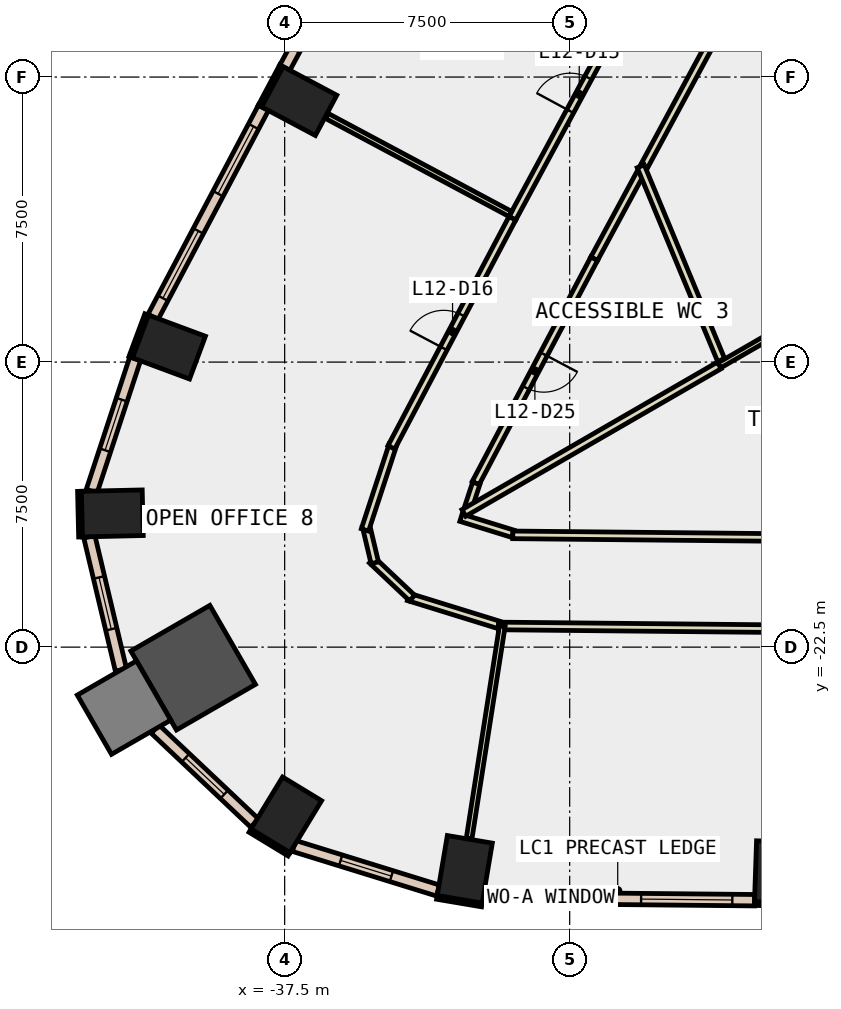
"""IFC4 building model, lengths in metres.
Left out: names, types, materials, properties, quantities, classifications, styles, units other than length and angle.
Written with IfcOpenShell. Run it as: python <this file> out.ifc"""

import sys

from ifc_helpers import new_model, si_unit, direction, frame, frame_2d, origin, origin_2d, place, context, subcontext, project, spatial, rectangle, extrude, element, fill, save


model = new_model("IFC4")
c1 = context("Model", 3, precision=1e-05, world=origin(), true_north=direction((0.0, 1.0)))
c2 = subcontext(c1, "Body", "Model", "MODEL_VIEW")
j1 = project(units=[si_unit("LENGTHUNIT", "METRE"), si_unit("PLANEANGLEUNIT", "RADIAN")], contexts=[c1])
p1 = place(None, origin())
s1 = spatial("IfcSite", under=j1, at=p1, CompositionType="ELEMENT")
p2 = place(p1, origin())
s2 = spatial("IfcBuilding", under=s1, at=p2, CompositionType="ELEMENT")
p3 = place(p2, frame((0.0, 0.0, 60.2)))
s3 = spatial("IfcBuildingStorey", under=s2, at=p3, CompositionType="ELEMENT", Elevation=60.2)
for number, where, z_axis, x_axis in (
    (1, (-32.761, -28.346, -0.4), (0.0, 0.0, 1.0), (-0.986, 0.167, 0.0)),
    (2, (-24.51, -28.416, -0.4), (0.0, 0.0, 1.0), (-0.999, 0.034, 0.0)),
    (3, (-37.117, -8.132, -0.4), (0.0, 0.0, 1.0), (0.469, 0.883, 0.0)),
    (4, (-40.544, -14.604, -0.4), (0.0, 0.0, 1.0), (0.348, 0.937, 0.0)),
    (5, (-42.035, -18.982, -0.4), (0.0, 0.0, 1.0), (-0.023, 1.0, 0.0)),
):
    element("IfcColumn", number, at=place(p3, frame(where, z_axis=z_axis, x_axis=x_axis)), inside=s3, PredefinedType="COLUMN", context=c2, shape_type="SweptSolid", body=[
        extrude(rectangle(XDim=1.2, YDim=1.6, at=origin_2d()), origin(), (0.0, 0.0, 1.0), 4.2),
    ])
p4 = place(p3, frame((-39.908, -23.041, -0.4), z_axis=(0.0, 0.0, 1.0), x_axis=(0.866025403784, 0.5, 0.0)))
e6 = element("IfcColumn", 6, at=p4, inside=s3, PredefinedType="COLUMN", context=c2, shape_type="SweptSolid", body=[
    extrude(rectangle(XDim=2.4, YDim=2.4, at=origin_2d()), origin(), (0.0, 0.0, 1.0), 4.2),
])
p5 = place(p3, frame((-37.457, -26.913, -0.4), z_axis=(0.0, 0.0, 1.0), x_axis=(-0.854522294989, 0.519414716163, 0.0)))
e7 = element("IfcColumn", 7, at=p5, inside=s3, PredefinedType="COLUMN", context=c2, shape_type="SweptSolid", body=[
    extrude(rectangle(XDim=1.2, YDim=1.6, at=origin_2d()), origin(), (0.0, 0.0, 1.0), 4.2),
])
p6 = place(p3, frame((-41.727, -24.091, -0.4), z_axis=(0.0, 0.0, 1.0), x_axis=(0.866025403784, 0.5, 0.0)))
e8 = element("IfcColumn", 8, at=p6, inside=s3, PredefinedType="COLUMN", context=c2, shape_type="SweptSolid", body=[
    extrude(rectangle(XDim=1.8, YDim=1.8, at=origin_2d()), origin(), (0.0, 0.0, 1.0), 4.2),
])
p7 = place(p3, frame((-37.586, -7.204, 0.0), z_axis=(0.0, 0.0, 1.0), x_axis=(-0.469467784567, -0.882949601763, 0.0)))
e9 = element("IfcWall", 9, at=p7, inside=s3, PredefinedType="STANDARD", context=c2, shape_type="SweptSolid", body=[
    extrude(rectangle(XDim=1.199, YDim=0.1, at=frame_2d((0.6, 0.0))), origin(), (0.0, 0.0, 1.0), 3.8),
])
p8 = place(p3, frame((-41.132, -13.746, 0.0), z_axis=(0.0, 0.0, 1.0), x_axis=(-0.348268249601, -0.937394914814, 0.0)))
e10 = element("IfcWall", 10, at=p8, inside=s3, PredefinedType="STANDARD", context=c2, shape_type="SweptSolid", body=[
    extrude(rectangle(XDim=1.2, YDim=0.1, at=frame_2d((0.6, 0.0))), origin(), (0.0, 0.0, 1.0), 3.8),
])
for number, where, z_axis, x_axis in (
    (11, (-33.494, -29.084, 0.0), (0.0, 0.0, 1.0), (0.986, -0.167, 0.0)),
    (12, (-25.138, -29.245, 0.0), (0.0, 0.0, 1.0), (0.999, -0.033, 0.0)),
):
    element("IfcWall", number, at=place(p3, frame(where, z_axis=z_axis, x_axis=x_axis)), inside=s3, PredefinedType="STANDARD", context=c2, shape_type="SweptSolid", body=[
        extrude(rectangle(XDim=1.2, YDim=0.1, at=frame_2d((0.6, 0.0))), origin(), (0.0, 0.0, 1.0), 3.8),
    ])
p9 = place(p3, frame((-42.899, -18.401, 0.0), z_axis=(0.0, 0.0, 1.0), x_axis=(0.023183352363, -0.999731229968, 0.0)))
e13 = element("IfcWall", 13, at=p9, inside=s3, PredefinedType="STANDARD", context=c2, shape_type="SweptSolid", body=[
    extrude(rectangle(XDim=1.2, YDim=0.1, at=frame_2d((0.6, 0.0))), origin(), (0.0, 0.0, 1.0), 3.8),
])
p10 = place(p3, frame((-38.411, -27.328, 0.0), z_axis=(0.0, 0.0, 1.0), x_axis=(0.854716608594, -0.519094903649, 0.0)))
e14 = element("IfcWall", 14, at=p10, inside=s3, PredefinedType="STANDARD", context=c2, shape_type="SweptSolid", body=[
    extrude(rectangle(XDim=1.2, YDim=0.1, at=frame_2d((0.6, 0.0))), origin(), (0.0, 0.0, 1.0), 3.8),
])
p11 = place(p3, frame((-32.279, -29.089, 0.0), z_axis=(0.0, 0.0, 1.0), x_axis=(0.999952253205, -0.009771965572, 0.0)))
e15 = element("IfcWall", 15, at=p11, inside=s3, PredefinedType="STANDARD", context=c2, shape_type="SweptSolid", body=[
    extrude(rectangle(XDim=7.145, YDim=0.3, at=frame_2d((3.573, 0.0))), origin(), (0.0, 0.0, 1.0), 3.8),
])
p12 = place(p11, frame((0.586, 0.0, 0.9)))
e16 = element("IfcOpeningElement", 16, at=p12, cuts=e15, PredefinedType="OPENING", context=c2, shape_type="SweptSolid", body=[
    extrude(rectangle(XDim=2.4, YDim=2.6, at=frame_2d((1.2, 1.3))), frame((0.0, 0.16, 0.0), z_axis=(0.0, -1.0, 0.0), x_axis=(1.0, 0.0, 0.0)), (0.0, 0.0, 1.0), 0.32),
])
p13 = place(p11, frame((4.159, 0.0, 0.9)))
e17 = element("IfcOpeningElement", 17, at=p13, cuts=e15, PredefinedType="OPENING", context=c2, shape_type="SweptSolid", body=[
    extrude(rectangle(XDim=2.4, YDim=2.6, at=frame_2d((1.2, 1.3))), frame((0.0, 0.16, 0.0), z_axis=(0.0, -1.0, 0.0), x_axis=(1.0, 0.0, 0.0)), (0.0, 0.0, 1.0), 0.32),
])
p14 = place(p3, frame((-34.583, -1.864, 0.0), z_axis=(0.0, 0.0, 1.0), x_axis=(-0.475413659872, -0.879762383833, 0.0)))
e18 = element("IfcWall", 18, at=p14, inside=s3, PredefinedType="STANDARD", context=c2, shape_type="SweptSolid", body=[
    extrude(rectangle(XDim=6.125, YDim=0.3, at=frame_2d((3.063, 0.0))), origin(), (0.0, 0.0, 1.0), 3.8),
])
p15 = place(p14, frame((0.531, 0.0, 0.9)))
e19 = element("IfcOpeningElement", 19, at=p15, cuts=e18, PredefinedType="OPENING", context=c2, shape_type="SweptSolid", body=[
    extrude(rectangle(XDim=2.0, YDim=2.6, at=frame_2d((1.0, 1.3))), frame((0.0, 0.16, 0.0), z_axis=(0.0, -1.0, 0.0), x_axis=(1.0, 0.0, 0.0)), (0.0, 0.0, 1.0), 0.32),
])
p16 = place(p14, frame((3.594, 0.0, 0.9)))
e20 = element("IfcOpeningElement", 20, at=p16, cuts=e18, PredefinedType="OPENING", context=c2, shape_type="SweptSolid", body=[
    extrude(rectangle(XDim=2.0, YDim=2.6, at=frame_2d((1.0, 1.3))), frame((0.0, 0.16, 0.0), z_axis=(0.0, -1.0, 0.0), x_axis=(1.0, 0.0, 0.0)), (0.0, 0.0, 1.0), 0.32),
])
p17 = place(p3, frame((-38.059, -8.31, 0.0), z_axis=(0.0, 0.0, 1.0), x_axis=(-0.467041710902, -0.884235285587, 0.0)))
e21 = element("IfcWall", 21, at=p17, inside=s3, PredefinedType="STANDARD", context=c2, shape_type="SweptSolid", body=[
    extrude(rectangle(XDim=6.22, YDim=0.3, at=frame_2d((3.11, 0.0))), origin(), (0.0, 0.0, 1.0), 3.8),
])
p18 = place(p17, frame((0.555, 0.0, 0.9)))
e22 = element("IfcOpeningElement", 22, at=p18, cuts=e21, PredefinedType="OPENING", context=c2, shape_type="SweptSolid", body=[
    extrude(rectangle(XDim=2.0, YDim=2.6, at=frame_2d((1.0, 1.3))), frame((0.0, 0.16, 0.0), z_axis=(0.0, -1.0, 0.0), x_axis=(1.0, 0.0, 0.0)), (0.0, 0.0, 1.0), 0.32),
])
p19 = place(p17, frame((3.665, 0.0, 0.9)))
e23 = element("IfcOpeningElement", 23, at=p19, cuts=e21, PredefinedType="OPENING", context=c2, shape_type="SweptSolid", body=[
    extrude(rectangle(XDim=2.0, YDim=2.6, at=frame_2d((1.0, 1.3))), frame((0.0, 0.16, 0.0), z_axis=(0.0, -1.0, 0.0), x_axis=(1.0, 0.0, 0.0)), (0.0, 0.0, 1.0), 0.32),
])
p20 = place(p3, frame((-41.434, -14.913, 0.0), z_axis=(0.0, 0.0, 1.0), x_axis=(-0.31208801137, -0.95005319491, 0.0)))
e24 = element("IfcWall", 24, at=p20, inside=s3, PredefinedType="STANDARD", context=c2, shape_type="SweptSolid", body=[
    extrude(rectangle(XDim=3.665, YDim=0.3, at=frame_2d((1.833, 0.0))), origin(), (0.0, 0.0, 1.0), 3.8),
])
p21 = place(p20, frame((1.133, 0.0, 0.9)))
e25 = element("IfcOpeningElement", 25, at=p21, cuts=e24, PredefinedType="OPENING", context=c2, shape_type="SweptSolid", body=[
    extrude(rectangle(XDim=1.4, YDim=2.6, at=frame_2d((0.7, 1.3))), frame((0.0, 0.16, 0.0), z_axis=(0.0, -1.0, 0.0), x_axis=(1.0, 0.0, 0.0)), (0.0, 0.0, 1.0), 0.32),
])
p22 = place(p3, frame((-42.64, -19.595, 0.0), z_axis=(0.0, 0.0, 1.0), x_axis=(0.230893603767, -0.972979004778, 0.0)))
e26 = element("IfcWall", 26, at=p22, inside=s3, PredefinedType="STANDARD", context=c2, shape_type="SweptSolid", body=[
    extrude(rectangle(XDim=3.603, YDim=0.3, at=frame_2d((1.801, 0.0))), origin(), (0.0, 0.0, 1.0), 3.8),
])
p23 = place(p22, frame((1.101, 0.0, 0.9)))
e27 = element("IfcOpeningElement", 27, at=p23, cuts=e26, PredefinedType="OPENING", context=c2, shape_type="SweptSolid", body=[
    extrude(rectangle(XDim=1.4, YDim=2.6, at=frame_2d((0.7, 1.3))), frame((0.0, 0.16, 0.0), z_axis=(0.0, -1.0, 0.0), x_axis=(1.0, 0.0, 0.0)), (0.0, 0.0, 1.0), 0.32),
])
p24 = place(p3, frame((-40.909, -24.657, 0.0), z_axis=(0.0, 0.0, 1.0), x_axis=(0.727082698591, -0.686549888508, 0.0)))
e28 = element("IfcWall", 28, at=p24, inside=s3, PredefinedType="STANDARD", context=c2, shape_type="SweptSolid", body=[
    extrude(rectangle(XDim=3.602, YDim=0.3, at=frame_2d((1.801, 0.0))), origin(), (0.0, 0.0, 1.0), 3.8),
])
p25 = place(p24, frame((1.101, 0.0, 0.9)))
e29 = element("IfcOpeningElement", 29, at=p25, cuts=e28, PredefinedType="OPENING", context=c2, shape_type="SweptSolid", body=[
    extrude(rectangle(XDim=1.4, YDim=2.6, at=frame_2d((0.7, 1.3))), frame((0.0, 0.16, 0.0), z_axis=(0.0, -1.0, 0.0), x_axis=(1.0, 0.0, 0.0)), (0.0, 0.0, 1.0), 0.32),
])
p26 = place(p3, frame((-37.254, -27.732, 0.0), z_axis=(0.0, 0.0, 1.0), x_axis=(0.955308230541, -0.295611543518, 0.0)))
e30 = element("IfcWall", 30, at=p26, inside=s3, PredefinedType="STANDARD", context=c2, shape_type="SweptSolid", body=[
    extrude(rectangle(XDim=3.968, YDim=0.3, at=frame_2d((1.984, 0.0))), origin(), (0.0, 0.0, 1.0), 3.8),
])
p27 = place(p26, frame((1.284, 0.0, 0.9)))
e31 = element("IfcOpeningElement", 31, at=p27, cuts=e30, PredefinedType="OPENING", context=c2, shape_type="SweptSolid", body=[
    extrude(rectangle(XDim=1.4, YDim=2.6, at=frame_2d((0.7, 1.3))), frame((0.0, 0.16, 0.0), z_axis=(0.0, -1.0, 0.0), x_axis=(1.0, 0.0, 0.0)), (0.0, 0.0, 1.0), 0.32),
])
p28 = place(p3, frame((-25.918, -5.916, 0.0), z_axis=(0.0, 0.0, 1.0), x_axis=(-0.4752384902, -0.879857021016, 0.0)))
e32 = element("IfcWall", 32, at=p28, inside=s3, PredefinedType="PARTITIONING", context=c2, shape_type="SweptSolid", body=[
    extrude(rectangle(XDim=4.473, YDim=0.2, at=frame_2d((2.237, 0.0))), origin(), (0.0, 0.0, 1.0), 3.8),
])
p29 = place(p3, frame((-28.139, -10.028, 0.0), z_axis=(0.0, 0.0, 1.0), x_axis=(-0.475287687013, -0.879830446491, 0.0)))
e33 = element("IfcWall", 33, at=p29, inside=s3, PredefinedType="PARTITIONING", context=c2, shape_type="SweptSolid", body=[
    extrude(rectangle(XDim=2.561, YDim=0.2, at=frame_2d((1.28, 0.0))), origin(), (0.0, 0.0, 1.0), 3.8),
])
p30 = place(p3, frame((-29.356, -12.281, 0.0), z_axis=(0.0, 0.0, 1.0), x_axis=(-0.467123190417, -0.884192244353, 0.0)))
e34 = element("IfcWall", 34, at=p30, inside=s3, PredefinedType="PARTITIONING", context=c2, shape_type="SweptSolid", body=[
    extrude(rectangle(XDim=6.677, YDim=0.2, at=frame_2d((3.339, 0.0))), origin(), (0.0, 0.0, 1.0), 3.8),
])
p31 = place(p30, frame((2.839, 0.0, 0.0)))
e35 = element("IfcOpeningElement", 35, at=p31, cuts=e34, PredefinedType="OPENING", context=c2, shape_type="SweptSolid", body=[
    extrude(rectangle(XDim=1.0, YDim=2.1, at=frame_2d((0.5, 1.05))), frame((0.0, 0.11, 0.0), z_axis=(0.0, -1.0, 0.0), x_axis=(1.0, 0.0, 0.0)), (0.0, 0.0, 1.0), 0.22),
])
p32 = place(p3, frame((-32.459, -18.191, 0.0), z_axis=(0.0, 0.0, 1.0), x_axis=(-0.312158013001, -0.950030196846, 0.0)))
e36 = element("IfcWall", 36, at=p32, inside=s3, PredefinedType="PARTITIONING", context=c2, shape_type="SweptSolid", body=[
    extrude(rectangle(XDim=0.666, YDim=0.2, at=frame_2d((0.333, 0.0))), origin(), (0.0, 0.0, 1.0), 3.8),
])
p33 = place(p3, frame((-32.861, -19.095, 0.0), z_axis=(0.0, 0.0, 1.0), x_axis=(0.955301951006, -0.29563183591, 0.0)))
e37 = element("IfcWall", 37, at=p33, inside=s3, PredefinedType="PARTITIONING", context=c2, shape_type="SweptSolid", body=[
    extrude(rectangle(XDim=1.431, YDim=0.2, at=frame_2d((0.716, 0.0))), origin(), (0.0, 0.0, 1.0), 3.8),
])
p34 = place(p3, frame((-31.498, -19.546, 0.0), z_axis=(0.0, 0.0, 1.0), x_axis=(0.999950985372, -0.009900851195, 0.0)))
e38 = element("IfcWall", 38, at=p34, inside=s3, PredefinedType="PARTITIONING", context=c2, shape_type="SweptSolid", body=[
    extrude(rectangle(XDim=6.978, YDim=0.2, at=frame_2d((3.489, 0.0))), origin(), (0.0, 0.0, 1.0), 3.8),
])
p35 = place(p3, frame((-31.509, -11.216, 0.0), z_axis=(0.0, 0.0, 1.0), x_axis=(0.475367159168, 0.879787510701, 0.0)))
e39 = element("IfcWall", 39, at=p35, inside=s3, PredefinedType="PARTITIONING", context=c2, shape_type="SweptSolid", body=[
    extrude(rectangle(XDim=7.257, YDim=0.2, at=frame_2d((3.629, 0.0))), origin(), (0.0, 0.0, 1.0), 3.8),
])
p36 = place(p35, frame((3.203, 0.0, 0.0)))
e40 = element("IfcOpeningElement", 40, at=p36, cuts=e39, PredefinedType="OPENING", context=c2, shape_type="SweptSolid", body=[
    extrude(rectangle(XDim=1.0, YDim=2.1, at=frame_2d((0.5, 1.05))), frame((0.0, 0.11, 0.0), z_axis=(0.0, -1.0, 0.0), x_axis=(1.0, 0.0, 0.0)), (0.0, 0.0, 1.0), 0.22),
])
p37 = place(p3, frame((-31.868, -21.914, 0.0), z_axis=(0.0, 0.0, 1.0), x_axis=(-0.955329505989, 0.295542780299, 0.0)))
e41 = element("IfcWall", 41, at=p37, inside=s3, PredefinedType="PARTITIONING", context=c2, shape_type="SweptSolid", body=[
    extrude(rectangle(XDim=2.484, YDim=0.2, at=frame_2d((1.242, 0.0))), origin(), (0.0, 0.0, 1.0), 3.8),
])
p38 = place(p3, frame((-34.146, -21.209, 0.0), z_axis=(0.0, 0.0, 1.0), x_axis=(-0.727092478665, 0.686539530885, 0.0)))
e42 = element("IfcWall", 42, at=p38, inside=s3, PredefinedType="PARTITIONING", context=c2, shape_type="SweptSolid", body=[
    extrude(rectangle(XDim=1.451, YDim=0.2, at=frame_2d((0.726, 0.0))), origin(), (0.0, 0.0, 1.0), 3.8),
])
p39 = place(p3, frame((-35.129, -20.281, 0.0), z_axis=(0.0, 0.0, 1.0), x_axis=(-0.230392306785, 0.973097829087, 0.0)))
e43 = element("IfcWall", 43, at=p39, inside=s3, PredefinedType="PARTITIONING", context=c2, shape_type="SweptSolid", body=[
    extrude(rectangle(XDim=0.986, YDim=0.2, at=frame_2d((0.493, 0.0))), origin(), (0.0, 0.0, 1.0), 3.8),
])
p40 = place(p3, frame((-35.387, -19.416, 0.0), z_axis=(0.0, 0.0, 1.0), x_axis=(0.31172635658, 0.950171920556, 0.0)))
e44 = element("IfcWall", 44, at=p40, inside=s3, PredefinedType="PARTITIONING", context=c2, shape_type="SweptSolid", body=[
    extrude(rectangle(XDim=2.345, YDim=0.2, at=frame_2d((1.172, 0.0))), origin(), (0.0, 0.0, 1.0), 3.8),
])
p41 = place(p3, frame((-34.692, -17.243, 0.0), z_axis=(0.0, 0.0, 1.0), x_axis=(0.467102540817, 0.884203153332, 0.0)))
e45 = element("IfcWall", 45, at=p41, inside=s3, PredefinedType="PARTITIONING", context=c2, shape_type="SweptSolid", body=[
    extrude(rectangle(XDim=6.816, YDim=0.2, at=frame_2d((3.408, 0.0))), origin(), (0.0, 0.0, 1.0), 3.8),
])
p42 = place(p41, frame((2.946, 0.0, 0.0)))
e46 = element("IfcOpeningElement", 46, at=p42, cuts=e45, PredefinedType="OPENING", context=c2, shape_type="SweptSolid", body=[
    extrude(rectangle(XDim=1.0, YDim=2.1, at=frame_2d((0.5, 1.05))), frame((0.0, 0.11, 0.0), z_axis=(0.0, -1.0, 0.0), x_axis=(1.0, 0.0, 0.0)), (0.0, 0.0, 1.0), 0.22),
])
p43 = place(p3, frame((-24.525, -22.015, 0.0), z_axis=(0.0, 0.0, 1.0), x_axis=(-0.999952295614, 0.009767624922, 0.0)))
e47 = element("IfcWall", 47, at=p43, inside=s3, PredefinedType="PARTITIONING", context=c2, shape_type="SweptSolid", body=[
    extrude(rectangle(XDim=7.348, YDim=0.2, at=frame_2d((3.674, 0.0))), origin(), (0.0, 0.0, 1.0), 3.8),
])
p44 = place(p3, frame((-25.323, -4.84, 0.0), z_axis=(0.0, 0.0, 1.0), x_axis=(0.500070797646, -0.865984524886, 0.0)))
e48 = element("IfcWall", 48, at=p44, inside=s3, PredefinedType="PARTITIONING", context=c2, shape_type="SweptSolid", body=[
    extrude(rectangle(XDim=5.763, YDim=0.2, at=frame_2d((2.882, 0.0))), origin(), (0.0, 0.0, 1.0), 3.8),
])
p45 = place(p3, frame((-26.015, -14.946, 0.0), z_axis=(0.0, 0.0, 1.0), x_axis=(-0.383189005855, 0.923669955012, 0.0)))
e49 = element("IfcWall", 49, at=p45, inside=s3, PredefinedType="PARTITIONING", context=c2, shape_type="SweptSolid", body=[
    extrude(rectangle(XDim=5.52, YDim=0.2, at=frame_2d((2.76, 0.0))), origin(), (0.0, 0.0, 1.0), 3.8),
])
p46 = place(p3, frame((-21.135, -12.243, 0.0), z_axis=(0.0, 0.0, 1.0), x_axis=(-0.866083439347, -0.499899465982, 0.0)))
e50 = element("IfcWall", 50, at=p46, inside=s3, PredefinedType="PARTITIONING", context=c2, shape_type="SweptSolid", body=[
    extrude(rectangle(XDim=5.691, YDim=0.15, at=frame_2d((2.846, 0.0))), origin(), (0.0, 0.0, 1.0), 3.8),
])
p47 = place(p3, frame((-26.064, -15.088, 0.0), z_axis=(0.0, 0.0, 1.0), x_axis=(-0.865982841629, -0.500073712571, 0.0)))
e51 = element("IfcWall", 51, at=p47, inside=s3, PredefinedType="PARTITIONING", context=c2, shape_type="SweptSolid", body=[
    extrude(rectangle(XDim=7.761, YDim=0.2, at=frame_2d((3.88, 0.0))), origin(), (0.0, 0.0, 1.0), 3.8),
])
p48 = place(p3, frame((-31.561, -11.103, 0.0), z_axis=(0.0, 0.0, 1.0), x_axis=(-0.882056805494, 0.47114306944, 0.0)))
e52 = element("IfcWall", 52, at=p48, inside=s3, PredefinedType="PARTITIONING", context=c2, shape_type="SweptSolid", body=[
    extrude(rectangle(XDim=5.48, YDim=0.15, at=frame_2d((2.74, 0.0))), origin(), (0.0, 0.0, 1.0), 3.8),
])
p49 = place(p3, frame((-31.773, -21.944, 0.0), z_axis=(0.0, 0.0, 1.0), x_axis=(-0.154313693693, -0.988021904585, 0.0)))
e53 = element("IfcWall", 53, at=p49, inside=s3, PredefinedType="PARTITIONING", context=c2, shape_type="SweptSolid", body=[
    extrude(rectangle(XDim=5.658, YDim=0.15, at=frame_2d((2.829, 0.0))), origin(), (0.0, 0.0, 1.0), 3.8),
])
p50 = place(p12, origin())
e54 = element("IfcWindow", 54, at=p50, inside=s3, PartitioningType="SINGLE_PANEL", PredefinedType="WINDOW", context=c2, shape_type="SweptSolid", body=[
    extrude(rectangle(XDim=2.4, YDim=2.6, at=frame_2d((1.2, 1.3))), frame((0.0, 0.03, 0.0), z_axis=(0.0, -1.0, 0.0), x_axis=(1.0, 0.0, 0.0)), (0.0, 0.0, 1.0), 0.06),
])
fill(e16, e54)
p51 = place(p13, origin())
e55 = element("IfcWindow", 55, at=p51, inside=s3, PartitioningType="SINGLE_PANEL", PredefinedType="WINDOW", context=c2, shape_type="SweptSolid", body=[
    extrude(rectangle(XDim=2.4, YDim=2.6, at=frame_2d((1.2, 1.3))), frame((0.0, 0.03, 0.0), z_axis=(0.0, -1.0, 0.0), x_axis=(1.0, 0.0, 0.0)), (0.0, 0.0, 1.0), 0.06),
])
fill(e17, e55)
p52 = place(p18, origin())
e56 = element("IfcWindow", 56, at=p52, inside=s3, PartitioningType="SINGLE_PANEL", PredefinedType="WINDOW", context=c2, shape_type="SweptSolid", body=[
    extrude(rectangle(XDim=2.0, YDim=2.6, at=frame_2d((1.0, 1.3))), frame((0.0, 0.03, 0.0), z_axis=(0.0, -1.0, 0.0), x_axis=(1.0, 0.0, 0.0)), (0.0, 0.0, 1.0), 0.06),
])
fill(e22, e56)
p53 = place(p19, origin())
e57 = element("IfcWindow", 57, at=p53, inside=s3, PartitioningType="SINGLE_PANEL", PredefinedType="WINDOW", context=c2, shape_type="SweptSolid", body=[
    extrude(rectangle(XDim=2.0, YDim=2.6, at=frame_2d((1.0, 1.3))), frame((0.0, 0.03, 0.0), z_axis=(0.0, -1.0, 0.0), x_axis=(1.0, 0.0, 0.0)), (0.0, 0.0, 1.0), 0.06),
])
fill(e23, e57)
p54 = place(p21, origin())
e58 = element("IfcWindow", 58, at=p54, inside=s3, PartitioningType="SINGLE_PANEL", PredefinedType="WINDOW", context=c2, shape_type="SweptSolid", body=[
    extrude(rectangle(XDim=1.4, YDim=2.6, at=frame_2d((0.7, 1.3))), frame((0.0, 0.03, 0.0), z_axis=(0.0, -1.0, 0.0), x_axis=(1.0, 0.0, 0.0)), (0.0, 0.0, 1.0), 0.06),
])
fill(e25, e58)
p55 = place(p23, origin())
e59 = element("IfcWindow", 59, at=p55, inside=s3, PartitioningType="SINGLE_PANEL", PredefinedType="WINDOW", context=c2, shape_type="SweptSolid", body=[
    extrude(rectangle(XDim=1.4, YDim=2.6, at=frame_2d((0.7, 1.3))), frame((0.0, 0.03, 0.0), z_axis=(0.0, -1.0, 0.0), x_axis=(1.0, 0.0, 0.0)), (0.0, 0.0, 1.0), 0.06),
])
fill(e27, e59)
p56 = place(p25, origin())
e60 = element("IfcWindow", 60, at=p56, inside=s3, PartitioningType="SINGLE_PANEL", PredefinedType="WINDOW", context=c2, shape_type="SweptSolid", body=[
    extrude(rectangle(XDim=1.4, YDim=2.6, at=frame_2d((0.7, 1.3))), frame((0.0, 0.03, 0.0), z_axis=(0.0, -1.0, 0.0), x_axis=(1.0, 0.0, 0.0)), (0.0, 0.0, 1.0), 0.06),
])
fill(e29, e60)
p57 = place(p27, origin())
e61 = element("IfcWindow", 61, at=p57, inside=s3, PartitioningType="SINGLE_PANEL", PredefinedType="WINDOW", context=c2, shape_type="SweptSolid", body=[
    extrude(rectangle(XDim=1.4, YDim=2.6, at=frame_2d((0.7, 1.3))), frame((0.0, 0.03, 0.0), z_axis=(0.0, -1.0, 0.0), x_axis=(1.0, 0.0, 0.0)), (0.0, 0.0, 1.0), 0.06),
])
fill(e31, e61)
p58 = place(p36, origin())
e62 = element("IfcDoor", 62, at=p58, inside=s3, OperationType="SINGLE_SWING_RIGHT", PredefinedType="DOOR", context=c2, shape_type="SweptSolid", body=[
    extrude(rectangle(XDim=1.0, YDim=2.1, at=frame_2d((0.5, 1.05))), frame((0.0, 0.025, 0.0), z_axis=(0.0, -1.0, 0.0), x_axis=(1.0, 0.0, 0.0)), (0.0, 0.0, 1.0), 0.05),
])
fill(e40, e62)
p59 = place(p42, origin())
e63 = element("IfcDoor", 63, at=p59, inside=s3, OperationType="SINGLE_SWING_LEFT", PredefinedType="DOOR", context=c2, shape_type="SweptSolid", body=[
    extrude(rectangle(XDim=1.0, YDim=2.1, at=frame_2d((0.5, 1.05))), frame((0.0, 0.025, 0.0), z_axis=(0.0, -1.0, 0.0), x_axis=(1.0, 0.0, 0.0)), (0.0, 0.0, 1.0), 0.05),
])
fill(e46, e63)
p60 = place(p31, origin())
e64 = element("IfcDoor", 64, at=p60, inside=s3, OperationType="SINGLE_SWING_LEFT", PredefinedType="DOOR", context=c2, shape_type="SweptSolid", body=[
    extrude(rectangle(XDim=1.0, YDim=2.1, at=frame_2d((0.5, 1.05))), frame((0.0, 0.025, 0.0), z_axis=(0.0, -1.0, 0.0), x_axis=(1.0, 0.0, 0.0)), (0.0, 0.0, 1.0), 0.05),
])
fill(e35, e64)
save(model, sys.argv[1])
